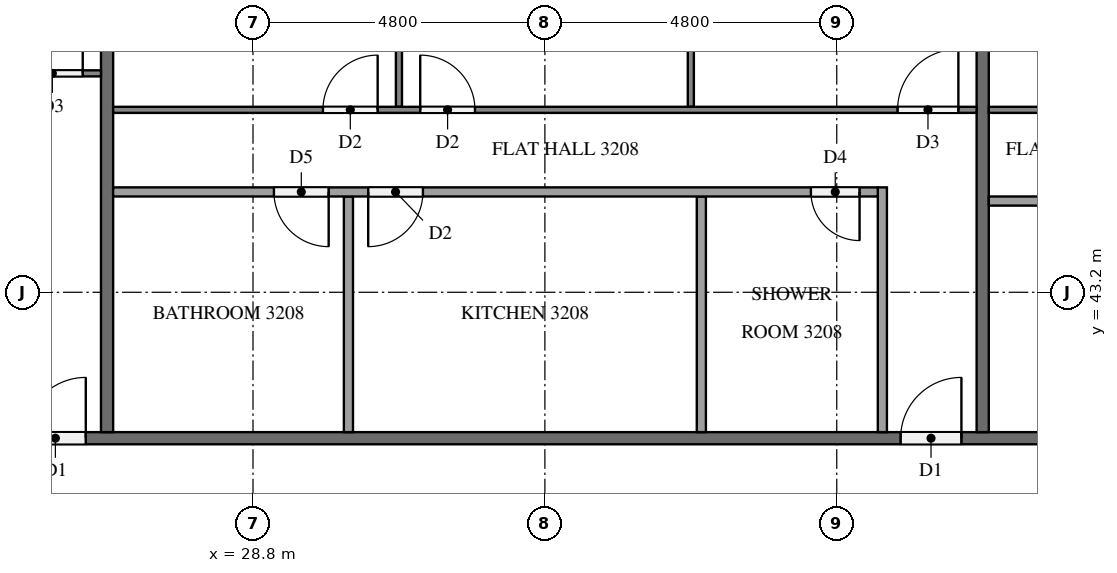
"""IFC4 building model, lengths in metres.
Left out: names, types, materials, properties, quantities, classifications, styles, units other than length and angle.
Written with IfcOpenShell. Run it as: python <this file> out.ifc"""

import sys

from ifc_helpers import new_model, si_unit, direction, frame, frame_2d, origin, place, context, subcontext, project, spatial, rectangle, extrude, element, fill, save


model = new_model("IFC4")
c1 = context("Model", 3, precision=1e-05, world=origin(), true_north=direction((0.0, 1.0)))
c2 = subcontext(c1, "Body", "Model", "MODEL_VIEW")
j1 = project(units=[si_unit("LENGTHUNIT", "METRE"), si_unit("PLANEANGLEUNIT", "RADIAN")], contexts=[c1])
p1 = place(None, origin())
s1 = spatial("IfcSite", under=j1, at=p1, CompositionType="ELEMENT")
p2 = place(p1, origin())
s2 = spatial("IfcBuilding", under=s1, at=p2, CompositionType="ELEMENT")
p3 = place(p2, frame((0.0, 0.0, 126.1)))
s3 = spatial("IfcBuildingStorey", under=s2, at=p3, CompositionType="ELEMENT", Elevation=126.1)
p4 = place(p3, frame((11.9, 40.8, 0.0), z_axis=(0.0, 0.0, 1.0), x_axis=(1.0, 0.0, 0.0)))
e1 = element("IfcWall", 1, at=p4, inside=s3, PredefinedType="PARTITIONING", context=c2, shape_type="SweptSolid", body=[
    extrude(rectangle(XDim=38.6, YDim=0.2, at=frame_2d((19.3, 0.0))), origin(), (0.0, 0.0, 1.0), 3.2),
])
p5 = place(p4, frame((37.15, 0.0, 0.0)))
e2 = element("IfcOpeningElement", 2, at=p5, cuts=e1, PredefinedType="OPENING", context=c2, shape_type="SweptSolid", body=[
    extrude(rectangle(XDim=1.0, YDim=2.1, at=frame_2d((0.5, 1.05))), frame((0.0, 0.11, 0.0), z_axis=(0.0, -1.0, 0.0), x_axis=(1.0, 0.0, 0.0)), (0.0, 0.0, 1.0), 0.22),
])
p6 = place(p4, frame((27.55, 0.0, 0.0)))
e3 = element("IfcOpeningElement", 3, at=p6, cuts=e1, PredefinedType="OPENING", context=c2, shape_type="SweptSolid", body=[
    extrude(rectangle(XDim=1.0, YDim=2.1, at=frame_2d((0.5, 1.05))), frame((0.0, 0.11, 0.0), z_axis=(0.0, -1.0, 0.0), x_axis=(1.0, 0.0, 0.0)), (0.0, 0.0, 1.0), 0.22),
])
p7 = place(p4, frame((13.15, 0.0, 0.0)))
e4 = element("IfcOpeningElement", 4, at=p7, cuts=e1, PredefinedType="OPENING", context=c2, shape_type="SweptSolid", body=[
    extrude(rectangle(XDim=1.0, YDim=2.1, at=frame_2d((0.5, 1.05))), frame((0.0, 0.11, 0.0), z_axis=(0.0, -1.0, 0.0), x_axis=(1.0, 0.0, 0.0)), (0.0, 0.0, 1.0), 0.22),
])
for number, where, z_axis, x_axis in (
    (5, (40.8, 52.7, 0.0), (0.0, 0.0, 1.0), (0.0, -1.0, 0.0)),
    (6, (26.4, 52.7, 0.0), (0.0, 0.0, 1.0), (0.0, -1.0, 0.0)),
):
    element("IfcWall", number, at=place(p3, frame(where, z_axis=z_axis, x_axis=x_axis)), inside=s3, PredefinedType="PARTITIONING", context=c2, shape_type="SweptSolid", body=[
        extrude(rectangle(XDim=11.8, YDim=0.2, at=frame_2d((5.9, 0.0))), origin(), (0.0, 0.0, 1.0), 3.2),
    ])
p8 = place(p3, frame((40.9, 46.2, 0.0), z_axis=(0.0, 0.0, 1.0), x_axis=(1.0, 0.0, 0.0)))
e7 = element("IfcWall", 7, at=p8, inside=s3, PredefinedType="PARTITIONING", context=c2, shape_type="SweptSolid", body=[
    extrude(rectangle(XDim=9.4, YDim=0.1, at=frame_2d((4.7, 0.0))), origin(), (0.0, 0.0, 1.0), 3.2),
])
p9 = place(p8, frame((5.05, 0.0, 0.0)))
e8 = element("IfcOpeningElement", 8, at=p9, cuts=e7, PredefinedType="OPENING", context=c2, shape_type="SweptSolid", body=[
    extrude(rectangle(XDim=1.0, YDim=2.1, at=frame_2d((0.5, 1.05))), frame((0.0, 0.06, 0.0), z_axis=(0.0, -1.0, 0.0), x_axis=(1.0, 0.0, 0.0)), (0.0, 0.0, 1.0), 0.12),
])
p10 = place(p8, frame((3.45, 0.0, 0.0)))
e9 = element("IfcOpeningElement", 9, at=p10, cuts=e7, PredefinedType="OPENING", context=c2, shape_type="SweptSolid", body=[
    extrude(rectangle(XDim=0.9, YDim=2.1, at=frame_2d((0.45, 1.05))), frame((0.0, 0.06, 0.0), z_axis=(0.0, -1.0, 0.0), x_axis=(1.0, 0.0, 0.0)), (0.0, 0.0, 1.0), 0.12),
])
p11 = place(p3, frame((48.675, 44.7, 0.0), z_axis=(0.0, 0.0, 1.0), x_axis=(-1.0, 0.0, 0.0)))
e10 = element("IfcWall", 10, at=p11, inside=s3, PredefinedType="PARTITIONING", context=c2, shape_type="SweptSolid", body=[
    extrude(rectangle(XDim=7.775, YDim=0.15, at=frame_2d((3.888, 0.0))), origin(), (0.0, 0.0, 1.0), 3.2),
])
p12 = place(p11, frame((1.985, 0.0, 0.0)))
e11 = element("IfcOpeningElement", 11, at=p12, cuts=e10, PredefinedType="OPENING", context=c2, shape_type="SweptSolid", body=[
    extrude(rectangle(XDim=0.8, YDim=2.1, at=frame_2d((0.4, 1.05))), frame((0.0, 0.085, 0.0), z_axis=(0.0, -1.0, 0.0), x_axis=(1.0, 0.0, 0.0)), (0.0, 0.0, 1.0), 0.17),
])
p13 = place(p11, frame((3.435, 0.0, 0.0)))
e12 = element("IfcOpeningElement", 12, at=p13, cuts=e10, PredefinedType="OPENING", context=c2, shape_type="SweptSolid", body=[
    extrude(rectangle(XDim=0.9, YDim=2.1, at=frame_2d((0.45, 1.05))), frame((0.0, 0.085, 0.0), z_axis=(0.0, -1.0, 0.0), x_axis=(1.0, 0.0, 0.0)), (0.0, 0.0, 1.0), 0.17),
])
for number, where, z_axis, x_axis in (
    (13, (36.0, 46.25, 0.0), (0.0, 0.0, 1.0), (0.0, 1.0, 0.0)),
    (14, (31.2, 46.25, 0.0), (0.0, 0.0, 1.0), (0.0, 1.0, 0.0)),
):
    element("IfcWall", number, at=place(p3, frame(where, z_axis=z_axis, x_axis=x_axis)), inside=s3, PredefinedType="PARTITIONING", context=c2, shape_type="SweptSolid", body=[
        extrude(rectangle(XDim=6.45, YDim=0.1, at=frame_2d((3.225, 0.0))), origin(), (0.0, 0.0, 1.0), 3.2),
    ])
p14 = place(p3, frame((26.5, 46.2, 0.0), z_axis=(0.0, 0.0, 1.0), x_axis=(1.0, 0.0, 0.0)))
e15 = element("IfcWall", 15, at=p14, inside=s3, PredefinedType="PARTITIONING", context=c2, shape_type="SweptSolid", body=[
    extrude(rectangle(XDim=14.2, YDim=0.1, at=frame_2d((7.1, 0.0))), origin(), (0.0, 0.0, 1.0), 3.2),
])
p15 = place(p14, frame((12.9, 0.0, 0.0)))
e16 = element("IfcOpeningElement", 16, at=p15, cuts=e15, PredefinedType="OPENING", context=c2, shape_type="SweptSolid", body=[
    extrude(rectangle(XDim=1.0, YDim=2.1, at=frame_2d((0.5, 1.05))), frame((0.0, 0.06, 0.0), z_axis=(0.0, -1.0, 0.0), x_axis=(1.0, 0.0, 0.0)), (0.0, 0.0, 1.0), 0.12),
])
p16 = place(p14, frame((5.05, 0.0, 0.0)))
e17 = element("IfcOpeningElement", 17, at=p16, cuts=e15, PredefinedType="OPENING", context=c2, shape_type="SweptSolid", body=[
    extrude(rectangle(XDim=0.9, YDim=2.1, at=frame_2d((0.45, 1.05))), frame((0.0, 0.06, 0.0), z_axis=(0.0, -1.0, 0.0), x_axis=(1.0, 0.0, 0.0)), (0.0, 0.0, 1.0), 0.12),
])
p17 = place(p14, frame((3.45, 0.0, 0.0)))
e18 = element("IfcOpeningElement", 18, at=p17, cuts=e15, PredefinedType="OPENING", context=c2, shape_type="SweptSolid", body=[
    extrude(rectangle(XDim=0.9, YDim=2.1, at=frame_2d((0.45, 1.05))), frame((0.0, 0.06, 0.0), z_axis=(0.0, -1.0, 0.0), x_axis=(1.0, 0.0, 0.0)), (0.0, 0.0, 1.0), 0.12),
])
for number, where, z_axis, x_axis in (
    (19, (36.173, 40.9, 0.0), (0.0, 0.0, 1.0), (0.0, 1.0, 0.0)),
    (20, (30.369, 40.9, 0.0), (0.0, 0.0, 1.0), (0.0, 1.0, 0.0)),
):
    element("IfcWall", number, at=place(p3, frame(where, z_axis=z_axis, x_axis=x_axis)), inside=s3, PredefinedType="PARTITIONING", context=c2, shape_type="SweptSolid", body=[
        extrude(rectangle(XDim=3.875, YDim=0.15, at=frame_2d((1.938, 0.0))), origin(), (0.0, 0.0, 1.0), 3.2),
    ])
p18 = place(p3, frame((39.15, 40.9, 0.0), z_axis=(0.0, 0.0, 1.0), x_axis=(0.0, 1.0, 0.0)))
e21 = element("IfcWall", 21, at=p18, inside=s3, PredefinedType="PARTITIONING", context=c2, shape_type="SweptSolid", body=[
    extrude(rectangle(XDim=4.025, YDim=0.15, at=frame_2d((2.013, 0.0))), origin(), (0.0, 0.0, 1.0), 3.2),
])
p19 = place(p3, frame((39.075, 44.85, 0.0), z_axis=(0.0, 0.0, 1.0), x_axis=(-1.0, 0.0, 0.0)))
e22 = element("IfcWall", 22, at=p19, inside=s3, PredefinedType="PARTITIONING", context=c2, shape_type="SweptSolid", body=[
    extrude(rectangle(XDim=12.575, YDim=0.15, at=frame_2d((6.288, 0.0))), origin(), (0.0, 0.0, 1.0), 3.2),
])
p20 = place(p19, frame((0.3, 0.0, 0.0)))
e23 = element("IfcOpeningElement", 23, at=p20, cuts=e22, PredefinedType="OPENING", context=c2, shape_type="SweptSolid", body=[
    extrude(rectangle(XDim=0.8, YDim=2.1, at=frame_2d((0.4, 1.05))), frame((0.0, 0.085, 0.0), z_axis=(0.0, -1.0, 0.0), x_axis=(1.0, 0.0, 0.0)), (0.0, 0.0, 1.0), 0.17),
])
p21 = place(p19, frame((7.481, 0.0, 0.0)))
e24 = element("IfcOpeningElement", 24, at=p21, cuts=e22, PredefinedType="OPENING", context=c2, shape_type="SweptSolid", body=[
    extrude(rectangle(XDim=0.9, YDim=2.1, at=frame_2d((0.45, 1.05))), frame((0.0, 0.085, 0.0), z_axis=(0.0, -1.0, 0.0), x_axis=(1.0, 0.0, 0.0)), (0.0, 0.0, 1.0), 0.17),
])
p22 = place(p19, frame((9.031, 0.0, 0.0)))
e25 = element("IfcOpeningElement", 25, at=p22, cuts=e22, PredefinedType="OPENING", context=c2, shape_type="SweptSolid", body=[
    extrude(rectangle(XDim=0.9, YDim=2.1, at=frame_2d((0.45, 1.05))), frame((0.0, 0.085, 0.0), z_axis=(0.0, -1.0, 0.0), x_axis=(1.0, 0.0, 0.0)), (0.0, 0.0, 1.0), 0.17),
])
p23 = place(p3, frame((12.1, 46.8, 0.0), z_axis=(0.0, 0.0, 1.0), x_axis=(1.0, 0.0, 0.0)))
e26 = element("IfcWall", 26, at=p23, inside=s3, PredefinedType="PARTITIONING", context=c2, shape_type="SweptSolid", body=[
    extrude(rectangle(XDim=14.2, YDim=0.1, at=frame_2d((7.1, 0.0))), origin(), (0.0, 0.0, 1.0), 3.2),
])
p24 = place(p23, frame((12.9, 0.0, 0.0)))
e27 = element("IfcOpeningElement", 27, at=p24, cuts=e26, PredefinedType="OPENING", context=c2, shape_type="SweptSolid", body=[
    extrude(rectangle(XDim=1.0, YDim=2.1, at=frame_2d((0.5, 1.05))), frame((0.0, 0.06, 0.0), z_axis=(0.0, -1.0, 0.0), x_axis=(1.0, 0.0, 0.0)), (0.0, 0.0, 1.0), 0.12),
])
p25 = place(p23, frame((5.05, 0.0, 0.0)))
e28 = element("IfcOpeningElement", 28, at=p25, cuts=e26, PredefinedType="OPENING", context=c2, shape_type="SweptSolid", body=[
    extrude(rectangle(XDim=0.9, YDim=2.1, at=frame_2d((0.45, 1.05))), frame((0.0, 0.06, 0.0), z_axis=(0.0, -1.0, 0.0), x_axis=(1.0, 0.0, 0.0)), (0.0, 0.0, 1.0), 0.12),
])
p26 = place(p23, frame((3.45, 0.0, 0.0)))
e29 = element("IfcOpeningElement", 29, at=p26, cuts=e26, PredefinedType="OPENING", context=c2, shape_type="SweptSolid", body=[
    extrude(rectangle(XDim=0.9, YDim=2.1, at=frame_2d((0.45, 1.05))), frame((0.0, 0.06, 0.0), z_axis=(0.0, -1.0, 0.0), x_axis=(1.0, 0.0, 0.0)), (0.0, 0.0, 1.0), 0.12),
])
p27 = place(p6, origin())
e30 = element("IfcDoor", 30, at=p27, inside=s3, OperationType="SINGLE_SWING_RIGHT", PredefinedType="DOOR", context=c2, shape_type="SweptSolid", body=[
    extrude(rectangle(XDim=1.0, YDim=2.1, at=frame_2d((0.5, 1.05))), frame((0.0, 0.025, 0.0), z_axis=(0.0, -1.0, 0.0), x_axis=(1.0, 0.0, 0.0)), (0.0, 0.0, 1.0), 0.05),
])
fill(e3, e30)
p28 = place(p7, origin())
e31 = element("IfcDoor", 31, at=p28, inside=s3, OperationType="SINGLE_SWING_RIGHT", PredefinedType="DOOR", context=c2, shape_type="SweptSolid", body=[
    extrude(rectangle(XDim=1.0, YDim=2.1, at=frame_2d((0.5, 1.05))), frame((0.0, 0.025, 0.0), z_axis=(0.0, -1.0, 0.0), x_axis=(1.0, 0.0, 0.0)), (0.0, 0.0, 1.0), 0.05),
])
fill(e4, e31)
p29 = place(p15, origin())
e32 = element("IfcDoor", 32, at=p29, inside=s3, OperationType="SINGLE_SWING_RIGHT", PredefinedType="DOOR", context=c2, shape_type="SweptSolid", body=[
    extrude(rectangle(XDim=1.0, YDim=2.1, at=frame_2d((0.5, 1.05))), frame((0.0, 0.025, 0.0), z_axis=(0.0, -1.0, 0.0), x_axis=(1.0, 0.0, 0.0)), (0.0, 0.0, 1.0), 0.05),
])
fill(e16, e32)
p30 = place(p16, origin())
e33 = element("IfcDoor", 33, at=p30, inside=s3, OperationType="SINGLE_SWING_LEFT", PredefinedType="DOOR", context=c2, shape_type="SweptSolid", body=[
    extrude(rectangle(XDim=0.9, YDim=2.1, at=frame_2d((0.45, 1.05))), frame((0.0, 0.025, 0.0), z_axis=(0.0, -1.0, 0.0), x_axis=(1.0, 0.0, 0.0)), (0.0, 0.0, 1.0), 0.05),
])
fill(e17, e33)
p31 = place(p17, origin())
e34 = element("IfcDoor", 34, at=p31, inside=s3, OperationType="SINGLE_SWING_RIGHT", PredefinedType="DOOR", context=c2, shape_type="SweptSolid", body=[
    extrude(rectangle(XDim=0.9, YDim=2.1, at=frame_2d((0.45, 1.05))), frame((0.0, 0.025, 0.0), z_axis=(0.0, -1.0, 0.0), x_axis=(1.0, 0.0, 0.0)), (0.0, 0.0, 1.0), 0.05),
])
fill(e18, e34)
p32 = place(p20, origin())
e35 = element("IfcDoor", 35, at=p32, inside=s3, OperationType="SINGLE_SWING_LEFT", PredefinedType="DOOR", context=c2, shape_type="SweptSolid", body=[
    extrude(rectangle(XDim=0.8, YDim=2.1, at=frame_2d((0.4, 1.05))), frame((0.0, 0.025, 0.0), z_axis=(0.0, -1.0, 0.0), x_axis=(1.0, 0.0, 0.0)), (0.0, 0.0, 1.0), 0.05),
])
fill(e23, e35)
p33 = place(p21, origin())
e36 = element("IfcDoor", 36, at=p33, inside=s3, OperationType="SINGLE_SWING_RIGHT", PredefinedType="DOOR", context=c2, shape_type="SweptSolid", body=[
    extrude(rectangle(XDim=0.9, YDim=2.1, at=frame_2d((0.45, 1.05))), frame((0.0, 0.025, 0.0), z_axis=(0.0, -1.0, 0.0), x_axis=(1.0, 0.0, 0.0)), (0.0, 0.0, 1.0), 0.05),
])
fill(e24, e36)
p34 = place(p22, origin())
e37 = element("IfcDoor", 37, at=p34, inside=s3, OperationType="SINGLE_SWING_LEFT", PredefinedType="DOOR", context=c2, shape_type="SweptSolid", body=[
    extrude(rectangle(XDim=0.9, YDim=2.1, at=frame_2d((0.45, 1.05))), frame((0.0, 0.025, 0.0), z_axis=(0.0, -1.0, 0.0), x_axis=(1.0, 0.0, 0.0)), (0.0, 0.0, 1.0), 0.05),
])
fill(e25, e37)
p35 = place(p24, origin())
e38 = element("IfcDoor", 38, at=p35, inside=s3, OperationType="SINGLE_SWING_RIGHT", PredefinedType="DOOR", context=c2, shape_type="SweptSolid", body=[
    extrude(rectangle(XDim=1.0, YDim=2.1, at=frame_2d((0.5, 1.05))), frame((0.0, 0.025, 0.0), z_axis=(0.0, -1.0, 0.0), x_axis=(1.0, 0.0, 0.0)), (0.0, 0.0, 1.0), 0.05),
])
fill(e27, e38)
save(model, sys.argv[1])
